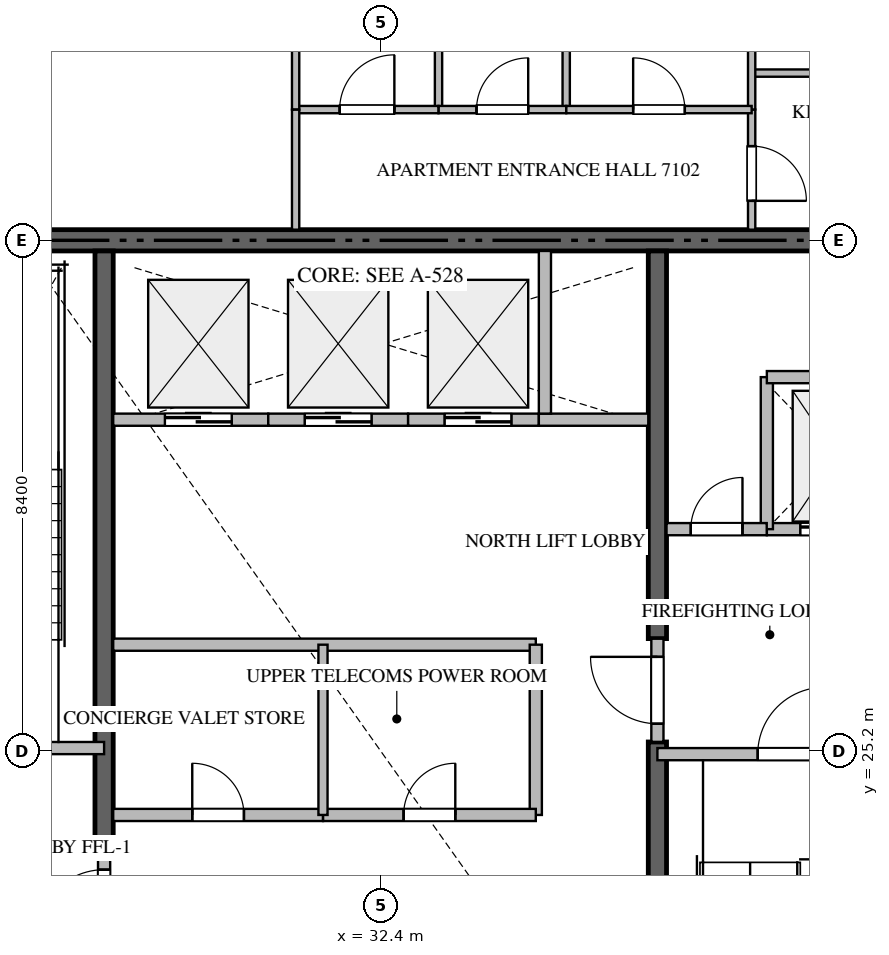
"""IFC4 building model, lengths in metres.
Left out: names, types, materials, properties, quantities, classifications, styles, units other than length and angle.
Written with IfcOpenShell. Run it as: python <this file> out.ifc"""

import sys

from ifc_helpers import new_model, si_unit, direction, frame, frame_2d, origin, place, context, subcontext, project, spatial, rectangle, extrude, source, transform, mapped, element, fill, save


model = new_model("IFC4")
c1 = context("Model", 3, precision=1e-05, world=origin(), true_north=direction((0.0, 1.0)))
c2 = subcontext(c1, "Body", "Model", "MODEL_VIEW")
j1 = project(units=[si_unit("LENGTHUNIT", "METRE"), si_unit("PLANEANGLEUNIT", "RADIAN")], contexts=[c1])
p1 = place(None, origin())
s1 = spatial("IfcSite", under=j1, at=p1, CompositionType="ELEMENT")
p2 = place(p1, origin())
s2 = spatial("IfcBuilding", under=s1, at=p2, CompositionType="ELEMENT")
p3 = place(p2, frame((0.0, 0.0, 283.6)))
s3 = spatial("IfcBuildingStorey", under=s2, at=p3, CompositionType="ELEMENT", Elevation=283.6)
p4 = place(p3, frame((41.4, 33.6, -0.26), z_axis=(0.0, 0.0, 1.0), x_axis=(-1.0, 0.0, 0.0)))
e1 = element("IfcWall", 1, at=p4, inside=s3, PredefinedType="SHEAR", context=c2, shape_type="SweptSolid", body=[
    extrude(rectangle(XDim=18.0, YDim=0.35, at=frame_2d((9.0, 0.0))), origin(), (0.0, 0.0, 1.0), 3.668),
])
p5 = place(p3, frame((27.85, 23.55, -0.26), z_axis=(0.0, 0.0, 1.0), x_axis=(0.0, 1.0, 0.0)))
e2 = element("IfcWall", 2, at=p5, inside=s3, PredefinedType="SHEAR", context=c2, shape_type="SweptSolid", body=[
    extrude(rectangle(XDim=9.875, YDim=0.3, at=frame_2d((4.938, 0.0))), origin(), (0.0, 0.0, 1.0), 3.668),
])
p6 = place(p3, frame((36.95, 16.975, -0.26), z_axis=(0.0, 0.0, 1.0), x_axis=(0.0, 1.0, 0.0)))
e3 = element("IfcWall", 3, at=p6, inside=s3, PredefinedType="SHEAR", context=c2, shape_type="SweptSolid", body=[
    extrude(rectangle(XDim=8.375, YDim=0.3, at=frame_2d((4.188, 0.0))), origin(), (0.0, 0.0, 1.0), 3.668),
])
p7 = place(p3, frame((36.95, 27.05, -0.26), z_axis=(0.0, 0.0, 1.0), x_axis=(0.0, 1.0, 0.0)))
e4 = element("IfcWall", 4, at=p7, inside=s3, PredefinedType="SHEAR", context=c2, shape_type="SweptSolid", body=[
    extrude(rectangle(XDim=6.375, YDim=0.3, at=frame_2d((3.188, 0.0))), origin(), (0.0, 0.0, 1.0), 3.668),
])
p8 = place(p3, frame((23.4, 25.25, 0.0), z_axis=(0.0, 0.0, 1.0), x_axis=(1.0, 0.0, 0.0)))
e5 = element("IfcWall", 5, at=p8, inside=s3, PredefinedType="STANDARD", context=c2, shape_type="SweptSolid", body=[
    extrude(rectangle(XDim=4.45, YDim=0.2, at=frame_2d((2.225, 0.0))), origin(), (0.0, 0.0, 1.0), 3.41),
])
p9 = place(p8, frame((1.65, 0.0, 0.0)))
e6 = element("IfcOpeningElement", 6, at=p9, cuts=e5, PredefinedType="OPENING", context=c2, shape_type="SweptSolid", body=[
    extrude(rectangle(XDim=1.1, YDim=2.15, at=frame_2d((0.55, 1.075))), frame((0.0, 0.11, 0.0), z_axis=(0.0, -1.0, 0.0), x_axis=(1.0, 0.0, 0.0)), (0.0, 0.0, 1.0), 0.22),
])
p10 = place(p3, frame((36.95, 25.15, 0.0), z_axis=(0.0, 0.0, 1.0), x_axis=(1.0, 0.0, 0.0)))
e7 = element("IfcWall", 7, at=p10, inside=s3, PredefinedType="STANDARD", context=c2, shape_type="SweptSolid", body=[
    extrude(rectangle(XDim=4.45, YDim=0.2, at=frame_2d((2.225, 0.0))), origin(), (0.0, 0.0, 1.0), 3.41),
])
p11 = place(p10, frame((1.65, 0.0, 0.0)))
e8 = element("IfcOpeningElement", 8, at=p11, cuts=e7, PredefinedType="OPENING", context=c2, shape_type="SweptSolid", body=[
    extrude(rectangle(XDim=1.1, YDim=2.15, at=frame_2d((0.55, 1.075))), frame((0.0, 0.11, 0.0), z_axis=(0.0, -1.0, 0.0), x_axis=(1.0, 0.0, 0.0)), (0.0, 0.0, 1.0), 0.22),
])
p12 = place(p3, frame((38.75, 28.85, 0.0), z_axis=(0.0, 0.0, 1.0), x_axis=(1.0, 0.0, 0.0)))
e9 = element("IfcWall", 9, at=p12, inside=s3, PredefinedType="STANDARD", context=c2, shape_type="SweptSolid", body=[
    extrude(rectangle(XDim=2.475, YDim=0.2, at=frame_2d((1.238, 0.0))), origin(), (0.0, 0.0, 1.0), 3.41),
])
p13 = place(p12, frame((0.55, 0.0, 0.0)))
e10 = element("IfcOpeningElement", 10, at=p13, cuts=e9, PredefinedType="OPENING", context=c2, shape_type="SweptSolid", body=[
    extrude(rectangle(XDim=1.2, YDim=2.2, at=frame_2d((0.6, 1.1))), frame((0.0, 0.11, 0.0), z_axis=(0.0, -1.0, 0.0), x_axis=(1.0, 0.0, 0.0)), (0.0, 0.0, 1.0), 0.22),
])
p14 = place(p3, frame((28.0, 30.65, 0.0), z_axis=(0.0, 0.0, 1.0), x_axis=(1.0, 0.0, 0.0)))
e11 = element("IfcWall", 11, at=p14, inside=s3, PredefinedType="STANDARD", context=c2, shape_type="SweptSolid", body=[
    extrude(rectangle(XDim=2.55, YDim=0.2, at=frame_2d((1.275, 0.0))), origin(), (0.0, 0.0, 1.0), 3.41),
])
p15 = place(p14, frame((0.85, 0.0, 0.0)))
e12 = element("IfcOpeningElement", 12, at=p15, cuts=e11, PredefinedType="OPENING", context=c2, shape_type="SweptSolid", body=[
    extrude(rectangle(XDim=1.1, YDim=2.2, at=frame_2d((0.55, 1.1))), frame((0.0, 0.11, 0.0), z_axis=(0.0, -1.0, 0.0), x_axis=(1.0, 0.0, 0.0)), (0.0, 0.0, 1.0), 0.22),
])
p16 = place(p3, frame((30.55, 30.65, 0.0), z_axis=(0.0, 0.0, 1.0), x_axis=(1.0, 0.0, 0.0)))
e13 = element("IfcWall", 13, at=p16, inside=s3, PredefinedType="STANDARD", context=c2, shape_type="SweptSolid", body=[
    extrude(rectangle(XDim=2.3, YDim=0.2, at=frame_2d((1.15, 0.0))), origin(), (0.0, 0.0, 1.0), 3.41),
])
p17 = place(p16, frame((0.6, 0.0, 0.0)))
e14 = element("IfcOpeningElement", 14, at=p17, cuts=e13, PredefinedType="OPENING", context=c2, shape_type="SweptSolid", body=[
    extrude(rectangle(XDim=1.1, YDim=2.2, at=frame_2d((0.55, 1.1))), frame((0.0, 0.11, 0.0), z_axis=(0.0, -1.0, 0.0), x_axis=(1.0, 0.0, 0.0)), (0.0, 0.0, 1.0), 0.22),
])
p18 = place(p3, frame((32.85, 30.65, 0.0), z_axis=(0.0, 0.0, 1.0), x_axis=(1.0, 0.0, 0.0)))
e15 = element("IfcWall", 15, at=p18, inside=s3, PredefinedType="STANDARD", context=c2, shape_type="SweptSolid", body=[
    extrude(rectangle(XDim=2.15, YDim=0.2, at=frame_2d((1.075, 0.0))), origin(), (0.0, 0.0, 1.0), 3.41),
])
p19 = place(p18, frame((0.6, 0.0, 0.0)))
e16 = element("IfcOpeningElement", 16, at=p19, cuts=e15, PredefinedType="OPENING", context=c2, shape_type="SweptSolid", body=[
    extrude(rectangle(XDim=1.1, YDim=2.2, at=frame_2d((0.55, 1.1))), frame((0.0, 0.11, 0.0), z_axis=(0.0, -1.0, 0.0), x_axis=(1.0, 0.0, 0.0)), (0.0, 0.0, 1.0), 0.22),
])
p20 = place(p3, frame((35.0, 30.65, 0.0), z_axis=(0.0, 0.0, 1.0), x_axis=(1.0, 0.0, 0.0)))
e17 = element("IfcWall", 17, at=p20, inside=s3, PredefinedType="STANDARD", context=c2, shape_type="SweptSolid", body=[
    extrude(rectangle(XDim=1.8, YDim=0.2, at=frame_2d((0.9, 0.0))), origin(), (0.0, 0.0, 1.0), 3.41),
])
p21 = place(p3, frame((35.1, 30.75, 0.0), z_axis=(0.0, 0.0, 1.0), x_axis=(0.0, 1.0, 0.0)))
e18 = element("IfcWall", 18, at=p21, inside=s3, PredefinedType="STANDARD", context=c2, shape_type="SweptSolid", body=[
    extrude(rectangle(XDim=2.675, YDim=0.2, at=frame_2d((1.337, 0.0))), origin(), (0.0, 0.0, 1.0), 3.41),
])
p22 = place(p3, frame((38.75, 28.85, 0.0), z_axis=(0.0, 0.0, 1.0), x_axis=(0.0, 1.0, 0.0)))
e19 = element("IfcWall", 19, at=p22, inside=s3, PredefinedType="STANDARD", context=c2, shape_type="SweptSolid", body=[
    extrude(rectangle(XDim=2.5, YDim=0.2, at=frame_2d((1.25, 0.0))), origin(), (0.0, 0.0, 1.0), 3.41),
])
p23 = place(p3, frame((38.75, 31.35, 0.0), z_axis=(0.0, 0.0, 1.0), x_axis=(1.0, 0.0, 0.0)))
e20 = element("IfcWall", 20, at=p23, inside=s3, PredefinedType="STANDARD", context=c2, shape_type="SweptSolid", body=[
    extrude(rectangle(XDim=2.475, YDim=0.2, at=frame_2d((1.238, 0.0))), origin(), (0.0, 0.0, 1.0), 3.41),
])
p24 = place(p3, frame((37.1, 28.85, 0.0), z_axis=(0.0, 0.0, 1.0), x_axis=(1.0, 0.0, 0.0)))
e21 = element("IfcWall", 21, at=p24, inside=s3, PredefinedType="STANDARD", context=c2, shape_type="SweptSolid", body=[
    extrude(rectangle(XDim=1.648, YDim=0.2, at=frame_2d((0.824, 0.0))), origin(), (0.0, 0.0, 1.0), 3.41),
])
p25 = place(p24, frame((0.399, 0.0, 0.0)))
e22 = element("IfcOpeningElement", 22, at=p25, cuts=e21, PredefinedType="OPENING", context=c2, shape_type="SweptSolid", body=[
    extrude(rectangle(XDim=0.85, YDim=2.1, at=frame_2d((0.425, 1.05))), frame((0.0, 0.11, 0.0), z_axis=(0.0, -1.0, 0.0), x_axis=(1.0, 0.0, 0.0)), (0.0, 0.0, 1.0), 0.22),
])
p26 = place(p3, frame((27.85, 21.852, 0.0), z_axis=(0.0, 0.0, 1.0), x_axis=(0.0, 1.0, 0.0)))
e23 = element("IfcWall", 23, at=p26, inside=s3, PredefinedType="STANDARD", context=c2, shape_type="SweptSolid", body=[
    extrude(rectangle(XDim=1.696, YDim=0.2, at=frame_2d((0.848, 0.0))), origin(), (0.0, 0.0, 1.0), 3.41),
])
p27 = place(p26, frame((0.298, 0.0, 0.0)))
e24 = element("IfcOpeningElement", 24, at=p27, cuts=e23, PredefinedType="OPENING", context=c2, shape_type="SweptSolid", body=[
    extrude(rectangle(XDim=1.1, YDim=2.15, at=frame_2d((0.55, 1.075))), frame((0.0, 0.11, 0.0), z_axis=(0.0, -1.0, 0.0), x_axis=(1.0, 0.0, 0.0)), (0.0, 0.0, 1.0), 0.22),
])
p28 = place(p3, frame((36.95, 25.352, 0.0), z_axis=(0.0, 0.0, 1.0), x_axis=(0.0, 1.0, 0.0)))
e25 = element("IfcWall", 25, at=p28, inside=s3, PredefinedType="STANDARD", context=c2, shape_type="SweptSolid", body=[
    extrude(rectangle(XDim=1.696, YDim=0.2, at=frame_2d((0.848, 0.0))), origin(), (0.0, 0.0, 1.0), 3.41),
])
p29 = place(p28, frame((0.298, 0.0, 0.0)))
e26 = element("IfcOpeningElement", 26, at=p29, cuts=e25, PredefinedType="OPENING", context=c2, shape_type="SweptSolid", body=[
    extrude(rectangle(XDim=1.1, YDim=2.15, at=frame_2d((0.55, 1.075))), frame((0.0, 0.11, 0.0), z_axis=(0.0, -1.0, 0.0), x_axis=(1.0, 0.0, 0.0)), (0.0, 0.0, 1.0), 0.22),
])
p30 = place(p3, frame((28.0, 26.95, 0.0), z_axis=(0.0, 0.0, 1.0), x_axis=(1.0, 0.0, 0.0)))
e27 = element("IfcWall", 27, at=p30, inside=s3, PredefinedType="STANDARD", context=c2, shape_type="SweptSolid", body=[
    extrude(rectangle(XDim=6.95, YDim=0.2, at=frame_2d((3.475, 0.0))), origin(), (0.0, 0.0, 1.0), 3.41),
])
p31 = place(p3, frame((34.95, 24.15, 0.0), z_axis=(0.0, 0.0, 1.0), x_axis=(0.0, 1.0, 0.0)))
e28 = element("IfcWall", 28, at=p31, inside=s3, PredefinedType="STANDARD", context=c2, shape_type="SweptSolid", body=[
    extrude(rectangle(XDim=2.8, YDim=0.2, at=frame_2d((1.4, 0.0))), origin(), (0.0, 0.0, 1.0), 3.41),
])
p32 = place(p3, frame((28.0, 24.15, 0.0), z_axis=(0.0, 0.0, 1.0), x_axis=(1.0, 0.0, 0.0)))
e29 = element("IfcWall", 29, at=p32, inside=s3, PredefinedType="STANDARD", context=c2, shape_type="SweptSolid", body=[
    extrude(rectangle(XDim=3.45, YDim=0.2, at=frame_2d((1.725, 0.0))), origin(), (0.0, 0.0, 1.0), 3.41),
])
p33 = place(p32, frame((1.3, 0.0, 0.0)))
e30 = element("IfcOpeningElement", 30, at=p33, cuts=e29, PredefinedType="OPENING", context=c2, shape_type="SweptSolid", body=[
    extrude(rectangle(XDim=0.85, YDim=2.1, at=frame_2d((0.425, 1.05))), frame((0.0, 0.11, 0.0), z_axis=(0.0, -1.0, 0.0), x_axis=(1.0, 0.0, 0.0)), (0.0, 0.0, 1.0), 0.22),
])
p34 = place(p3, frame((31.452, 24.15, 0.0), z_axis=(0.0, 0.0, 1.0), x_axis=(1.0, 0.0, 0.0)))
e31 = element("IfcWall", 31, at=p34, inside=s3, PredefinedType="STANDARD", context=c2, shape_type="SweptSolid", body=[
    extrude(rectangle(XDim=3.498, YDim=0.2, at=frame_2d((1.749, 0.0))), origin(), (0.0, 0.0, 1.0), 3.41),
])
p35 = place(p34, frame((1.324, 0.0, 0.0)))
e32 = element("IfcOpeningElement", 32, at=p35, cuts=e31, PredefinedType="OPENING", context=c2, shape_type="SweptSolid", body=[
    extrude(rectangle(XDim=0.85, YDim=2.1, at=frame_2d((0.425, 1.05))), frame((0.0, 0.11, 0.0), z_axis=(0.0, -1.0, 0.0), x_axis=(1.0, 0.0, 0.0)), (0.0, 0.0, 1.0), 0.22),
])
p36 = place(p3, frame((31.45, 24.15, 0.0), z_axis=(0.0, 0.0, 1.0), x_axis=(0.0, 1.0, 0.0)))
e33 = element("IfcWall", 33, at=p36, inside=s3, PredefinedType="PARTITIONING", context=c2, shape_type="SweptSolid", body=[
    extrude(rectangle(XDim=2.8, YDim=0.15, at=frame_2d((1.4, 0.0))), origin(), (0.0, 0.0, 1.0), 3.41),
])
p37 = place(p3, frame((38.5, 36.35, 0.0), z_axis=(0.0, 0.0, 1.0), x_axis=(1.0, 0.0, 0.0)))
e34 = element("IfcWall", 34, at=p37, inside=s3, PredefinedType="PARTITIONING", context=c2, shape_type="SweptSolid", body=[
    extrude(rectangle(XDim=2.85, YDim=0.12, at=frame_2d((1.425, 0.0))), origin(), (0.0, 0.0, 1.0), 3.41),
])
p38 = place(p37, frame((1.0, 0.0, 0.0)))
e35 = element("IfcOpeningElement", 35, at=p38, cuts=e34, PredefinedType="OPENING", context=c2, shape_type="SweptSolid", body=[
    extrude(rectangle(XDim=0.85, YDim=2.1, at=frame_2d((0.425, 1.05))), frame((0.0, 0.07, 0.0), z_axis=(0.0, -1.0, 0.0), x_axis=(1.0, 0.0, 0.0)), (0.0, 0.0, 1.0), 0.14),
])
p39 = place(p3, frame((38.5, 35.75, 0.0), z_axis=(0.0, 0.0, 1.0), x_axis=(0.0, -1.0, 0.0)))
e36 = element("IfcWall", 36, at=p39, inside=s3, PredefinedType="PARTITIONING", context=c2, shape_type="SweptSolid", body=[
    extrude(rectangle(XDim=1.975, YDim=0.12, at=frame_2d((0.988, 0.0))), origin(), (0.0, 0.0, 1.0), 3.41),
])
p40 = place(p39, frame((0.601, 0.0, 0.0)))
e37 = element("IfcOpeningElement", 37, at=p40, cuts=e36, PredefinedType="OPENING", context=c2, shape_type="SweptSolid", body=[
    extrude(rectangle(XDim=0.9, YDim=2.1, at=frame_2d((0.45, 1.05))), frame((0.0, 0.07, 0.0), z_axis=(0.0, -1.0, 0.0), x_axis=(1.0, 0.0, 0.0)), (0.0, 0.0, 1.0), 0.14),
])
p41 = place(p3, frame((38.5, 42.248, 0.0), z_axis=(0.0, 0.0, 1.0), x_axis=(0.0, -1.0, 0.0)))
e38 = element("IfcWall", 38, at=p41, inside=s3, PredefinedType="PARTITIONING", context=c2, shape_type="SweptSolid", body=[
    extrude(rectangle(XDim=6.496, YDim=0.12, at=frame_2d((3.248, 0.0))), origin(), (0.0, 0.0, 1.0), 3.41),
])
p42 = place(p3, frame((33.35, 49.105, 0.0), z_axis=(0.0, 0.0, 1.0), x_axis=(0.0, -1.0, 0.0)))
e39 = element("IfcWall", 39, at=p42, inside=s3, PredefinedType="PARTITIONING", context=c2, shape_type="SweptSolid", body=[
    extrude(rectangle(XDim=13.355, YDim=0.12, at=frame_2d((6.677, 0.0))), origin(), (0.0, 0.0, 1.0), 3.41),
])
p43 = place(p3, frame((35.45, 42.25, 0.0), z_axis=(0.0, 0.0, 1.0), x_axis=(0.0, -1.0, 0.0)))
e40 = element("IfcWall", 40, at=p43, inside=s3, PredefinedType="PARTITIONING", context=c2, shape_type="SweptSolid", body=[
    extrude(rectangle(XDim=6.5, YDim=0.12, at=frame_2d((3.25, 0.0))), origin(), (0.0, 0.0, 1.0), 3.41),
])
p44 = place(p3, frame((33.35, 35.75, 0.0), z_axis=(0.0, 0.0, 1.0), x_axis=(1.0, 0.0, 0.0)))
e41 = element("IfcWall", 41, at=p44, inside=s3, PredefinedType="PARTITIONING", context=c2, shape_type="SweptSolid", body=[
    extrude(rectangle(XDim=2.1, YDim=0.12, at=frame_2d((1.05, 0.0))), origin(), (0.0, 0.0, 1.0), 3.41),
])
p45 = place(p44, frame((0.625, 0.0, 0.0)))
e42 = element("IfcOpeningElement", 42, at=p45, cuts=e41, PredefinedType="OPENING", context=c2, shape_type="SweptSolid", body=[
    extrude(rectangle(XDim=0.85, YDim=2.1, at=frame_2d((0.425, 1.05))), frame((0.0, 0.07, 0.0), z_axis=(0.0, -1.0, 0.0), x_axis=(1.0, 0.0, 0.0)), (0.0, 0.0, 1.0), 0.14),
])
p46 = place(p3, frame((35.452, 35.75, 0.0), z_axis=(0.0, 0.0, 1.0), x_axis=(1.0, 0.0, 0.0)))
e43 = element("IfcWall", 43, at=p46, inside=s3, PredefinedType="PARTITIONING", context=c2, shape_type="SweptSolid", body=[
    extrude(rectangle(XDim=3.048, YDim=0.12, at=frame_2d((1.524, 0.0))), origin(), (0.0, 0.0, 1.0), 3.41),
])
p47 = place(p46, frame((1.099, 0.0, 0.0)))
e44 = element("IfcOpeningElement", 44, at=p47, cuts=e43, PredefinedType="OPENING", context=c2, shape_type="SweptSolid", body=[
    extrude(rectangle(XDim=0.85, YDim=2.1, at=frame_2d((0.425, 1.05))), frame((0.0, 0.07, 0.0), z_axis=(0.0, -1.0, 0.0), x_axis=(1.0, 0.0, 0.0)), (0.0, 0.0, 1.0), 0.14),
])
p48 = place(p3, frame((31.0, 35.75, 0.0), z_axis=(0.0, 0.0, 1.0), x_axis=(1.0, 0.0, 0.0)))
e45 = element("IfcWall", 45, at=p48, inside=s3, PredefinedType="PARTITIONING", context=c2, shape_type="SweptSolid", body=[
    extrude(rectangle(XDim=2.348, YDim=0.12, at=frame_2d((1.174, 0.0))), origin(), (0.0, 0.0, 1.0), 3.41),
])
p49 = place(p48, frame((0.724, 0.0, 0.0)))
e46 = element("IfcOpeningElement", 46, at=p49, cuts=e45, PredefinedType="OPENING", context=c2, shape_type="SweptSolid", body=[
    extrude(rectangle(XDim=0.9, YDim=2.1, at=frame_2d((0.45, 1.05))), frame((0.0, 0.07, 0.0), z_axis=(0.0, -1.0, 0.0), x_axis=(1.0, 0.0, 0.0)), (0.0, 0.0, 1.0), 0.14),
])
p50 = place(p3, frame((31.0, 41.81, 0.0), z_axis=(0.0, 0.0, 1.0), x_axis=(0.0, -1.0, 0.0)))
e47 = element("IfcWall", 47, at=p50, inside=s3, PredefinedType="PARTITIONING", context=c2, shape_type="SweptSolid", body=[
    extrude(rectangle(XDim=6.06, YDim=0.12, at=frame_2d((3.03, 0.0))), origin(), (0.0, 0.0, 1.0), 3.41),
])
p51 = place(p50, frame((2.605, 0.0, 0.0)))
e48 = element("IfcOpeningElement", 48, at=p51, cuts=e47, PredefinedType="OPENING", context=c2, shape_type="SweptSolid", body=[
    extrude(rectangle(XDim=0.85, YDim=2.1, at=frame_2d((0.425, 1.05))), frame((0.0, 0.07, 0.0), z_axis=(0.0, -1.0, 0.0), x_axis=(1.0, 0.0, 0.0)), (0.0, 0.0, 1.0), 0.14),
])
p52 = place(p3, frame((31.0, 35.748, 0.0), z_axis=(0.0, 0.0, 1.0), x_axis=(0.0, -1.0, 0.0)))
e49 = element("IfcWall", 49, at=p52, inside=s3, PredefinedType="PARTITIONING", context=c2, shape_type="SweptSolid", body=[
    extrude(rectangle(XDim=1.973, YDim=0.12, at=frame_2d((0.987, 0.0))), origin(), (0.0, 0.0, 1.0), 3.41),
])
m1 = source(origin(), c2, "Body", "SweptSolid", [
    extrude(rectangle(XDim=1.1, YDim=2.15, at=frame_2d((0.55, 1.075))), frame((0.0, 0.025, 0.0), z_axis=(0.0, -1.0, 0.0), x_axis=(1.0, 0.0, 0.0)), (0.0, 0.0, 1.0), 0.05),
])
p53 = place(p11, origin())
e50 = element("IfcDoor", 50, at=p53, inside=s3, OperationType="SINGLE_SWING_RIGHT", PredefinedType="DOOR", context=c2, shape_type="MappedRepresentation", body=[
    mapped(m1, transform((0.0, 0.0, 0.0), scale=1.0)),
])
fill(e8, e50)
m2 = source(origin(), c2, "Body", "SweptSolid", [
    extrude(rectangle(XDim=1.2, YDim=2.2, at=frame_2d((0.6, 1.1))), frame((0.0, 0.025, 0.0), z_axis=(0.0, -1.0, 0.0), x_axis=(1.0, 0.0, 0.0)), (0.0, 0.0, 1.0), 0.05),
])
p54 = place(p13, origin())
e51 = element("IfcDoor", 51, at=p54, inside=s3, OperationType="DOUBLE_DOOR_SLIDING", PredefinedType="DOOR", context=c2, shape_type="MappedRepresentation", body=[
    mapped(m2, transform((0.0, 0.0, 0.0), scale=1.0)),
])
fill(e10, e51)
m3 = source(origin(), c2, "Body", "SweptSolid", [
    extrude(rectangle(XDim=1.1, YDim=2.2, at=frame_2d((0.55, 1.1))), frame((0.0, 0.025, 0.0), z_axis=(0.0, -1.0, 0.0), x_axis=(1.0, 0.0, 0.0)), (0.0, 0.0, 1.0), 0.05),
])
p55 = place(p15, origin())
e52 = element("IfcDoor", 52, at=p55, inside=s3, OperationType="DOUBLE_DOOR_SLIDING", PredefinedType="DOOR", context=c2, shape_type="MappedRepresentation", body=[
    mapped(m3, transform((0.0, 0.0, 0.0), scale=1.0)),
])
fill(e12, e52)
p56 = place(p17, origin())
e53 = element("IfcDoor", 53, at=p56, inside=s3, OperationType="DOUBLE_DOOR_SLIDING", PredefinedType="DOOR", context=c2, shape_type="MappedRepresentation", body=[
    mapped(m3, transform((0.0, 0.0, 0.0), scale=1.0)),
])
fill(e14, e53)
p57 = place(p19, origin())
e54 = element("IfcDoor", 54, at=p57, inside=s3, OperationType="DOUBLE_DOOR_SLIDING", PredefinedType="DOOR", context=c2, shape_type="MappedRepresentation", body=[
    mapped(m3, transform((0.0, 0.0, 0.0), scale=1.0)),
])
fill(e16, e54)
m4 = source(origin(), c2, "Body", "SweptSolid", [
    extrude(rectangle(XDim=0.85, YDim=2.1, at=frame_2d((0.425, 1.05))), frame((0.0, 0.025, 0.0), z_axis=(0.0, -1.0, 0.0), x_axis=(1.0, 0.0, 0.0)), (0.0, 0.0, 1.0), 0.05),
])
p58 = place(p25, origin())
e55 = element("IfcDoor", 55, at=p58, inside=s3, OperationType="SINGLE_SWING_RIGHT", PredefinedType="DOOR", context=c2, shape_type="MappedRepresentation", body=[
    mapped(m4, transform((0.0, 0.0, 0.0), scale=1.0)),
])
fill(e22, e55)
p59 = place(p27, origin())
e56 = element("IfcDoor", 56, at=p59, inside=s3, OperationType="SINGLE_SWING_LEFT", PredefinedType="DOOR", context=c2, shape_type="MappedRepresentation", body=[
    mapped(m1, transform((0.0, 0.0, 0.0), scale=1.0)),
])
fill(e24, e56)
p60 = place(p29, origin())
e57 = element("IfcDoor", 57, at=p60, inside=s3, OperationType="SINGLE_SWING_RIGHT", PredefinedType="DOOR", context=c2, shape_type="MappedRepresentation", body=[
    mapped(m1, transform((0.0, 0.0, 0.0), scale=1.0)),
])
fill(e26, e57)
p61 = place(p33, origin())
e58 = element("IfcDoor", 58, at=p61, inside=s3, OperationType="SINGLE_SWING_LEFT", PredefinedType="DOOR", context=c2, shape_type="MappedRepresentation", body=[
    mapped(m4, transform((0.0, 0.0, 0.0), scale=1.0)),
])
fill(e30, e58)
p62 = place(p35, origin())
e59 = element("IfcDoor", 59, at=p62, inside=s3, OperationType="SINGLE_SWING_RIGHT", PredefinedType="DOOR", context=c2, shape_type="MappedRepresentation", body=[
    mapped(m4, transform((0.0, 0.0, 0.0), scale=1.0)),
])
fill(e32, e59)
m5 = source(origin(), c2, "Body", "SweptSolid", [
    extrude(rectangle(XDim=0.9, YDim=2.1, at=frame_2d((0.45, 1.05))), frame((0.0, 0.025, 0.0), z_axis=(0.0, -1.0, 0.0), x_axis=(1.0, 0.0, 0.0)), (0.0, 0.0, 1.0), 0.05),
])
p63 = place(p40, origin())
e60 = element("IfcDoor", 60, at=p63, inside=s3, OperationType="SINGLE_SWING_RIGHT", PredefinedType="DOOR", context=c2, shape_type="MappedRepresentation", body=[
    mapped(m5, transform((0.0, 0.0, 0.0), scale=1.0)),
])
fill(e37, e60)
p64 = place(p45, origin())
e61 = element("IfcDoor", 61, at=p64, inside=s3, OperationType="SINGLE_SWING_RIGHT", PredefinedType="DOOR", context=c2, shape_type="MappedRepresentation", body=[
    mapped(m4, transform((0.0, 0.0, 0.0), scale=1.0)),
])
fill(e42, e61)
p65 = place(p47, origin())
e62 = element("IfcDoor", 62, at=p65, inside=s3, OperationType="SINGLE_SWING_LEFT", PredefinedType="DOOR", context=c2, shape_type="MappedRepresentation", body=[
    mapped(m4, transform((0.0, 0.0, 0.0), scale=1.0)),
])
fill(e44, e62)
p66 = place(p49, origin())
e63 = element("IfcDoor", 63, at=p66, inside=s3, OperationType="SINGLE_SWING_RIGHT", PredefinedType="DOOR", context=c2, shape_type="MappedRepresentation", body=[
    mapped(m5, transform((0.0, 0.0, 0.0), scale=1.0)),
])
fill(e46, e63)
save(model, sys.argv[1])
